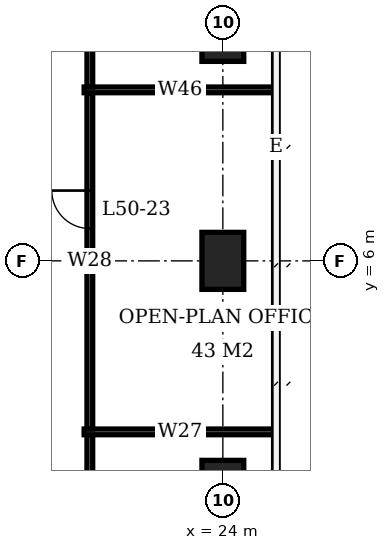
"""IFC4 building model, lengths in metres.
Left out: names, types, materials, properties, quantities, classifications, styles, units other than length and angle.
Written with IfcOpenShell. Run it as: python <this file> out.ifc"""

import sys

from ifc_helpers import new_model, si_unit, direction, frame, frame_2d, origin, origin_2d, place, context, subcontext, project, spatial, rectangle, extrude, element, fill, save


model = new_model("IFC4")
c1 = context("Model", 3, precision=1e-05, world=origin(), true_north=direction((0.0, 1.0)))
c2 = subcontext(c1, "Body", "Model", "MODEL_VIEW")
j1 = project(units=[si_unit("LENGTHUNIT", "METRE"), si_unit("PLANEANGLEUNIT", "RADIAN")], contexts=[c1])
p1 = place(None, origin())
s1 = spatial("IfcSite", under=j1, at=p1, CompositionType="ELEMENT")
p2 = place(p1, origin())
s2 = spatial("IfcBuilding", under=s1, at=p2, CompositionType="ELEMENT")
p3 = place(p2, frame((0.0, 0.0, 204.5)))
s3 = spatial("IfcBuildingStorey", under=s2, at=p3, CompositionType="ELEMENT", Elevation=204.5)
for number, where, z_axis, x_axis in (
    (1, (24.0, 0.0, 0.0), (0.0, 0.0, 1.0), (0.0, 1.0, 0.0)),
    (2, (24.0, 6.0, 0.0), (0.0, 0.0, 1.0), (0.0, 1.0, 0.0)),
    (3, (24.0, 12.0, 0.0), (0.0, 0.0, 1.0), (0.0, 1.0, 0.0)),
):
    element("IfcColumn", number, at=place(p3, frame(where, z_axis=z_axis, x_axis=x_axis)), inside=s3, PredefinedType="COLUMN", context=c2, shape_type="SweptSolid", body=[
        extrude(rectangle(XDim=1.5, YDim=1.1, at=origin_2d()), origin(), (0.0, 0.0, 1.0), 3.9),
    ])
p4 = place(p3, frame((20.5, -11.388, 0.0), z_axis=(0.0, 0.0, 1.0), x_axis=(0.0, 1.0, 0.0)))
e4 = element("IfcWall", 4, at=p4, inside=s3, PredefinedType="PARTITIONING", context=c2, shape_type="SweptSolid", body=[
    extrude(rectangle(XDim=12.813, YDim=0.15, at=frame_2d((6.406, 0.0))), origin(), (0.0, 0.0, 1.0), 3.65),
])
p5 = place(p4, frame((7.895, 0.0, 0.0)))
e5 = element("IfcOpeningElement", 5, at=p5, cuts=e4, PredefinedType="OPENING", context=c2, shape_type="SweptSolid", body=[
    extrude(rectangle(XDim=1.0, YDim=2.1, at=frame_2d((0.5, 1.05))), frame((0.0, 0.085, 0.0), z_axis=(0.0, -1.0, 0.0), x_axis=(1.0, 0.0, 0.0)), (0.0, 0.0, 1.0), 0.17),
])
p6 = place(p3, frame((20.5, 1.575, 0.0), z_axis=(0.0, 0.0, 1.0), x_axis=(0.0, 1.0, 0.0)))
e6 = element("IfcWall", 6, at=p6, inside=s3, PredefinedType="PARTITIONING", context=c2, shape_type="SweptSolid", body=[
    extrude(rectangle(XDim=8.85, YDim=0.15, at=frame_2d((4.425, 0.0))), origin(), (0.0, 0.0, 1.0), 3.65),
])
p7 = place(p6, frame((5.275, 0.0, 0.0)))
e7 = element("IfcOpeningElement", 7, at=p7, cuts=e6, PredefinedType="OPENING", context=c2, shape_type="SweptSolid", body=[
    extrude(rectangle(XDim=1.0, YDim=2.1, at=frame_2d((0.5, 1.05))), frame((0.0, 0.085, 0.0), z_axis=(0.0, -1.0, 0.0), x_axis=(1.0, 0.0, 0.0)), (0.0, 0.0, 1.0), 0.17),
])
p8 = place(p3, frame((20.35, 1.5, 0.0), z_axis=(0.0, 0.0, 1.0), x_axis=(1.0, 0.0, 0.0)))
e8 = element("IfcWall", 8, at=p8, inside=s3, PredefinedType="PARTITIONING", context=c2, shape_type="SweptSolid", body=[
    extrude(rectangle(XDim=5.05, YDim=0.15, at=frame_2d((2.525, 0.0))), origin(), (0.0, 0.0, 1.0), 3.65),
])
p9 = place(p3, frame((20.5, 10.575, 0.0), z_axis=(0.0, 0.0, 1.0), x_axis=(0.0, 1.0, 0.0)))
e9 = element("IfcWall", 9, at=p9, inside=s3, PredefinedType="PARTITIONING", context=c2, shape_type="SweptSolid", body=[
    extrude(rectangle(XDim=12.715, YDim=0.15, at=frame_2d((6.357, 0.0))), origin(), (0.0, 0.0, 1.0), 3.65),
])
p10 = place(p9, frame((11.415, 0.0, 0.0)))
e10 = element("IfcOpeningElement", 10, at=p10, cuts=e9, PredefinedType="OPENING", context=c2, shape_type="SweptSolid", body=[
    extrude(rectangle(XDim=1.0, YDim=2.1, at=frame_2d((0.5, 1.05))), frame((0.0, 0.085, 0.0), z_axis=(0.0, -1.0, 0.0), x_axis=(1.0, 0.0, 0.0)), (0.0, 0.0, 1.0), 0.17),
])
p11 = place(p3, frame((20.35, 10.5, 0.0), z_axis=(0.0, 0.0, 1.0), x_axis=(1.0, 0.0, 0.0)))
e11 = element("IfcWall", 11, at=p11, inside=s3, PredefinedType="PARTITIONING", context=c2, shape_type="SweptSolid", body=[
    extrude(rectangle(XDim=5.05, YDim=0.15, at=frame_2d((2.525, 0.0))), origin(), (0.0, 0.0, 1.0), 3.65),
])
p12 = place(p7, origin())
e12 = element("IfcDoor", 12, at=p12, inside=s3, OperationType="SINGLE_SWING_RIGHT", PredefinedType="DOOR", context=c2, shape_type="SweptSolid", body=[
    extrude(rectangle(XDim=1.0, YDim=2.1, at=frame_2d((0.5, 1.05))), frame((0.0, 0.025, 0.0), z_axis=(0.0, -1.0, 0.0), x_axis=(1.0, 0.0, 0.0)), (0.0, 0.0, 1.0), 0.05),
])
fill(e7, e12)
save(model, sys.argv[1])
